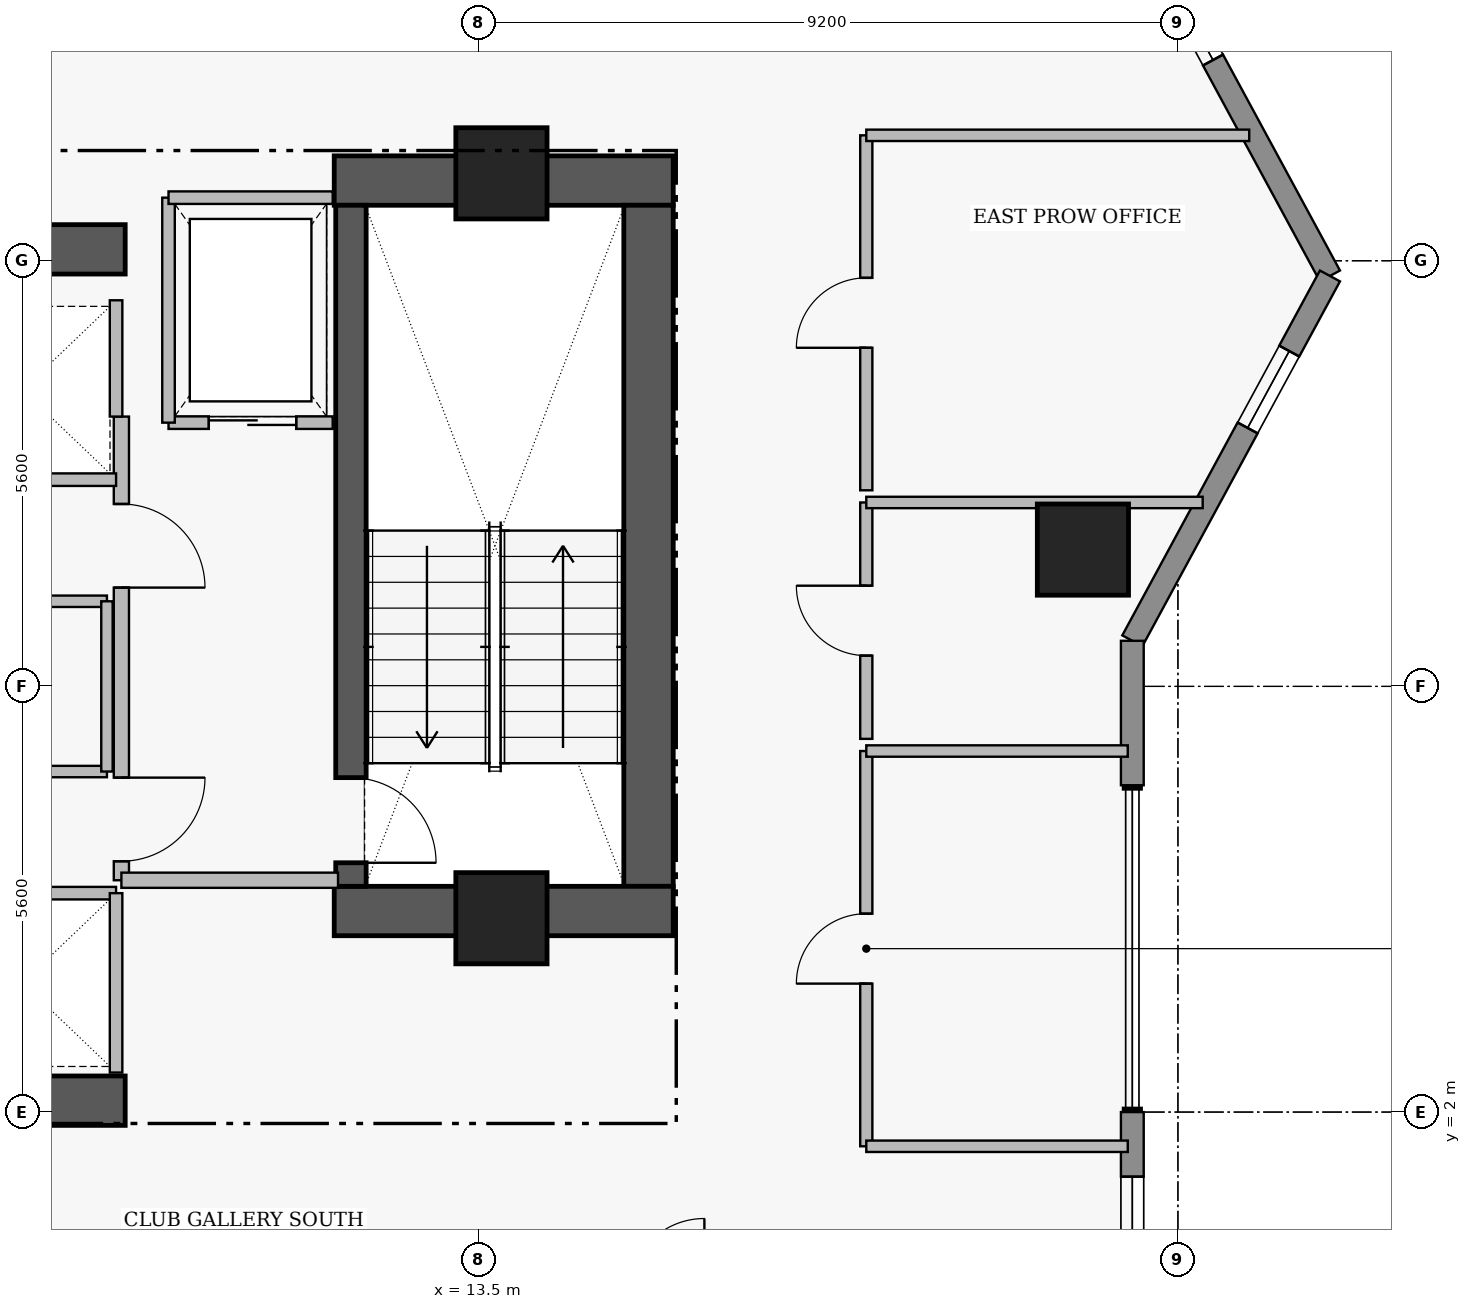
"""IFC4 building model, lengths in metres.
Left out: names, types, materials, properties, quantities, classifications, styles, units other than length and angle.
Written with IfcOpenShell. Run it as: python <this file> out.ifc"""

import sys

from ifc_helpers import new_model, si_unit, direction, frame, frame_2d, origin, origin_2d, place, context, subcontext, project, spatial, rectangle, extrude, element, fill, save


model = new_model("IFC4")
c1 = context("Model", 3, precision=1e-05, world=origin(), true_north=direction((0.0, 1.0)))
c2 = subcontext(c1, "Body", "Model", "MODEL_VIEW")
j1 = project(units=[si_unit("LENGTHUNIT", "METRE"), si_unit("PLANEANGLEUNIT", "RADIAN")], contexts=[c1])
p1 = place(None, origin())
s1 = spatial("IfcSite", under=j1, at=p1, CompositionType="ELEMENT")
p2 = place(p1, origin())
s2 = spatial("IfcBuilding", under=s1, at=p2, CompositionType="ELEMENT")
p3 = place(p2, frame((0.0, 0.0, 199.9)))
s3 = spatial("IfcBuildingStorey", under=s2, at=p3, CompositionType="ELEMENT", Elevation=199.9)
p4 = place(p3, frame((11.6, 14.255, 0.0), z_axis=(0.0, 0.0, 1.0), x_axis=(1.0, 0.0, 0.0)))
e1 = element("IfcWall", 1, at=p4, inside=s3, PredefinedType="SHEAR", context=c2, shape_type="SweptSolid", body=[
    extrude(rectangle(XDim=4.46, YDim=0.65, at=frame_2d((2.23, 0.0))), origin(), (0.0, 0.0, 1.0), 3.56),
])
p5 = place(p3, frame((15.735, 4.97, 0.0), z_axis=(0.0, 0.0, 1.0), x_axis=(0.0, 1.0, 0.0)))
e2 = element("IfcWall", 2, at=p5, inside=s3, PredefinedType="SHEAR", context=c2, shape_type="SweptSolid", body=[
    extrude(rectangle(XDim=8.96, YDim=0.65, at=frame_2d((4.48, 0.0))), origin(), (0.0, 0.0, 1.0), 3.56),
])
p6 = place(p3, frame((11.6, 4.645, 0.0), z_axis=(0.0, 0.0, 1.0), x_axis=(1.0, 0.0, 0.0)))
e3 = element("IfcWall", 3, at=p6, inside=s3, PredefinedType="SHEAR", context=c2, shape_type="SweptSolid", body=[
    extrude(rectangle(XDim=4.46, YDim=0.65, at=frame_2d((2.23, 0.0))), origin(), (0.0, 0.0, 1.0), 3.56),
])
for number, where, z_axis, x_axis in (
    (4, (1.25, 2.15, 0.0), (0.0, 0.0, 1.0), (1.0, 0.0, 0.0)),
    (5, (1.25, 13.35, 0.0), (0.0, 0.0, 1.0), (1.0, 0.0, 0.0)),
):
    element("IfcWall", number, at=place(p3, frame(where, z_axis=z_axis, x_axis=x_axis)), inside=s3, PredefinedType="SHEAR", context=c2, shape_type="SweptSolid", body=[
        extrude(rectangle(XDim=7.6, YDim=0.65, at=frame_2d((3.8, 0.0))), origin(), (0.0, 0.0, 1.0), 3.53),
    ])
p7 = place(p3, frame((11.82, 13.93, 0.0), z_axis=(0.0, 0.0, 1.0), x_axis=(0.0, -1.0, 0.0)))
e6 = element("IfcWall", 6, at=p7, inside=s3, PredefinedType="SHEAR", context=c2, shape_type="SweptSolid", body=[
    extrude(rectangle(XDim=8.96, YDim=0.4, at=frame_2d((4.48, 0.0))), origin(), (0.0, 0.0, 1.0), 3.56),
])
p8 = place(p7, frame((7.53, 0.0, 0.0)))
e7 = element("IfcOpeningElement", 7, at=p8, cuts=e6, PredefinedType="OPENING", context=c2, shape_type="SweptSolid", body=[
    extrude(rectangle(XDim=1.12, YDim=2.22, at=frame_2d((0.56, 1.11))), frame((0.0, 0.21, 0.0), z_axis=(0.0, -1.0, 0.0), x_axis=(1.0, 0.0, 0.0)), (0.0, 0.0, 1.0), 0.42),
])
for number, where, z_axis, x_axis in (
    (8, (13.8, 14.35, 0.0), (0.0, 0.0, 1.0), (1.0, 0.0, 0.0)),
    (9, (13.8, 4.55, 0.0), (0.0, 0.0, 1.0), (1.0, 0.0, 0.0)),
    (10, (21.45, 9.4, 0.0), (0.0, 0.0, 1.0), (1.0, 0.0, 0.0)),
):
    element("IfcColumn", number, at=place(p3, frame(where, z_axis=z_axis, x_axis=x_axis)), inside=s3, PredefinedType="COLUMN", context=c2, shape_type="SweptSolid", body=[
        extrude(rectangle(XDim=1.2, YDim=1.2, at=origin_2d()), origin(), (0.0, 0.0, 1.0), 3.75),
    ])
p9 = place(p3, frame((22.1, 17.8, 0.0), z_axis=(0.0, 0.0, 1.0), x_axis=(0.476258655584, -0.879305233114, 0.0)))
e11 = element("IfcWall", 11, at=p9, inside=s3, PredefinedType="STANDARD", context=c2, shape_type="SweptSolid", body=[
    extrude(rectangle(XDim=5.459, YDim=0.3, at=frame_2d((2.729, 0.0))), origin(), (0.0, 0.0, 1.0), 3.53),
])
p10 = place(p9, frame((1.078, 0.0, 1.25)))
e12 = element("IfcOpeningElement", 12, at=p10, cuts=e11, PredefinedType="OPENING", context=c2, shape_type="SweptSolid", body=[
    extrude(rectangle(XDim=1.15, YDim=1.55, at=frame_2d((0.575, 0.775))), frame((0.0, 0.16, 0.0), z_axis=(0.0, -1.0, 0.0), x_axis=(1.0, 0.0, 0.0)), (0.0, 0.0, 1.0), 0.32),
])
p11 = place(p3, frame((24.7, 13.0, 0.0), z_axis=(0.0, 0.0, 1.0), x_axis=(-0.476258655584, -0.879305233114, 0.0)))
e13 = element("IfcWall", 13, at=p11, inside=s3, PredefinedType="STANDARD", context=c2, shape_type="SweptSolid", body=[
    extrude(rectangle(XDim=5.459, YDim=0.3, at=frame_2d((2.729, 0.0))), origin(), (0.0, 0.0, 1.0), 3.53),
])
p12 = place(p11, frame((1.124, 0.0, 1.25)))
e14 = element("IfcOpeningElement", 14, at=p12, cuts=e13, PredefinedType="OPENING", context=c2, shape_type="SweptSolid", body=[
    extrude(rectangle(XDim=1.15, YDim=1.55, at=frame_2d((0.575, 0.775))), frame((0.0, 0.16, 0.0), z_axis=(0.0, -1.0, 0.0), x_axis=(1.0, 0.0, 0.0)), (0.0, 0.0, 1.0), 0.32),
])
p13 = place(p3, frame((22.1, 8.2, 0.0), z_axis=(0.0, 0.0, 1.0), x_axis=(0.0, -1.0, 0.0)))
e15 = element("IfcWall", 15, at=p13, inside=s3, PredefinedType="STANDARD", context=c2, shape_type="SweptSolid", body=[
    extrude(rectangle(XDim=1.9, YDim=0.3, at=frame_2d((0.95, 0.0))), origin(), (0.0, 0.0, 1.0), 3.53),
])
p14 = place(p3, frame((22.1, 2.0, 0.0), z_axis=(0.0, 0.0, 1.0), x_axis=(0.0, -1.0, 0.0)))
e16 = element("IfcWall", 16, at=p14, inside=s3, PredefinedType="STANDARD", context=c2, shape_type="SweptSolid", body=[
    extrude(rectangle(XDim=2.85, YDim=0.3, at=frame_2d((1.425, 0.0))), origin(), (0.0, 0.0, 1.0), 3.53),
])
p15 = place(p14, frame((0.85, 0.0, 0.95)))
e17 = element("IfcOpeningElement", 17, at=p15, cuts=e16, PredefinedType="OPENING", context=c2, shape_type="SweptSolid", body=[
    extrude(rectangle(XDim=1.15, YDim=1.55, at=frame_2d((0.575, 0.775))), frame((0.0, 0.16, 0.0), z_axis=(0.0, -1.0, 0.0), x_axis=(1.0, 0.0, 0.0)), (0.0, 0.0, 1.0), 0.32),
])
p16 = place(p3, frame((8.8, 11.15, 0.0), z_axis=(0.0, 0.0, 1.0), x_axis=(0.0, -1.0, 0.0)))
e18 = element("IfcWall", 18, at=p16, inside=s3, PredefinedType="PARTITIONING", context=c2, shape_type="SweptSolid", body=[
    extrude(rectangle(XDim=6.1, YDim=0.2, at=frame_2d((3.05, 0.0))), origin(), (0.0, 0.0, 1.0), 3.53),
])
p17 = place(p16, frame((1.15, 0.0, 0.0)))
e19 = element("IfcOpeningElement", 19, at=p17, cuts=e18, PredefinedType="OPENING", context=c2, shape_type="SweptSolid", body=[
    extrude(rectangle(XDim=1.1, YDim=2.2, at=frame_2d((0.55, 1.1))), frame((0.0, 0.11, 0.0), z_axis=(0.0, -1.0, 0.0), x_axis=(1.0, 0.0, 0.0)), (0.0, 0.0, 1.0), 0.22),
])
p18 = place(p16, frame((4.75, 0.0, 0.0)))
e20 = element("IfcOpeningElement", 20, at=p18, cuts=e18, PredefinedType="OPENING", context=c2, shape_type="SweptSolid", body=[
    extrude(rectangle(XDim=1.1, YDim=2.2, at=frame_2d((0.55, 1.1))), frame((0.0, 0.11, 0.0), z_axis=(0.0, -1.0, 0.0), x_axis=(1.0, 0.0, 0.0)), (0.0, 0.0, 1.0), 0.22),
])
p19 = place(p3, frame((9.42, 11.07, 0.0), z_axis=(0.0, 0.0, 1.0), x_axis=(1.0, 0.0, 0.0)))
e21 = element("IfcWall", 21, at=p19, inside=s3, PredefinedType="PARTITIONING", context=c2, shape_type="SweptSolid", body=[
    extrude(rectangle(XDim=2.16, YDim=0.165, at=frame_2d((1.08, 0.0))), origin(), (0.0, 0.0, 1.0), 3.53),
])
p20 = place(p19, frame((0.53, 0.0, 0.0)))
e22 = element("IfcOpeningElement", 22, at=p20, cuts=e21, PredefinedType="OPENING", context=c2, shape_type="SweptSolid", body=[
    extrude(rectangle(XDim=1.15, YDim=2.25, at=frame_2d((0.575, 1.125))), frame((0.0, 0.093, 0.0), z_axis=(0.0, -1.0, 0.0), x_axis=(1.0, 0.0, 0.0)), (0.0, 0.0, 1.0), 0.185),
])
p21 = place(p3, frame((4.37, 6.48, 0.0), z_axis=(0.0, 0.0, 1.0), x_axis=(1.0, 0.0, 0.0)))
e23 = element("IfcWall", 23, at=p21, inside=s3, PredefinedType="PARTITIONING", context=c2, shape_type="SweptSolid", body=[
    extrude(rectangle(XDim=4.24, YDim=0.15, at=frame_2d((2.12, 0.0))), origin(), (0.0, 0.0, 1.0), 3.53),
])
p22 = place(p21, frame((1.67, 0.0, 0.0)))
e24 = element("IfcOpeningElement", 24, at=p22, cuts=e23, PredefinedType="OPENING", context=c2, shape_type="SweptSolid", body=[
    extrude(rectangle(XDim=0.9, YDim=2.15, at=frame_2d((0.45, 1.075))), frame((0.0, 0.085, 0.0), z_axis=(0.0, -1.0, 0.0), x_axis=(1.0, 0.0, 0.0)), (0.0, 0.0, 1.0), 0.17),
])
p23 = place(p3, frame((18.6, 1.55, 0.0), z_axis=(0.0, 0.0, 1.0), x_axis=(0.0, 1.0, 0.0)))
e25 = element("IfcWall", 25, at=p23, inside=s3, PredefinedType="PARTITIONING", context=c2, shape_type="SweptSolid", body=[
    extrude(rectangle(XDim=5.2, YDim=0.16, at=frame_2d((2.6, 0.0))), origin(), (0.0, 0.0, 1.0), 3.53),
])
p24 = place(p23, frame((2.14, 0.0, 0.0)))
e26 = element("IfcOpeningElement", 26, at=p24, cuts=e25, PredefinedType="OPENING", context=c2, shape_type="SweptSolid", body=[
    extrude(rectangle(XDim=0.92, YDim=2.12, at=frame_2d((0.46, 1.06))), frame((0.0, 0.09, 0.0), z_axis=(0.0, -1.0, 0.0), x_axis=(1.0, 0.0, 0.0)), (0.0, 0.0, 1.0), 0.18),
])
p25 = place(p3, frame((18.6, 6.91, 0.0), z_axis=(0.0, 0.0, 1.0), x_axis=(0.0, 1.0, 0.0)))
e27 = element("IfcWall", 27, at=p25, inside=s3, PredefinedType="PARTITIONING", context=c2, shape_type="SweptSolid", body=[
    extrude(rectangle(XDim=3.11, YDim=0.16, at=frame_2d((1.555, 0.0))), origin(), (0.0, 0.0, 1.0), 3.53),
])
p26 = place(p25, frame((1.095, 0.0, 0.0)))
e28 = element("IfcOpeningElement", 28, at=p26, cuts=e27, PredefinedType="OPENING", context=c2, shape_type="SweptSolid", body=[
    extrude(rectangle(XDim=0.92, YDim=2.12, at=frame_2d((0.46, 1.06))), frame((0.0, 0.09, 0.0), z_axis=(0.0, -1.0, 0.0), x_axis=(1.0, 0.0, 0.0)), (0.0, 0.0, 1.0), 0.18),
])
p27 = place(p3, frame((18.6, 10.18, 0.0), z_axis=(0.0, 0.0, 1.0), x_axis=(0.0, 1.0, 0.0)))
e29 = element("IfcWall", 29, at=p27, inside=s3, PredefinedType="PARTITIONING", context=c2, shape_type="SweptSolid", body=[
    extrude(rectangle(XDim=4.67, YDim=0.16, at=frame_2d((2.335, 0.0))), origin(), (0.0, 0.0, 1.0), 3.53),
])
p28 = place(p27, frame((1.875, 0.0, 0.0)))
e30 = element("IfcOpeningElement", 30, at=p28, cuts=e29, PredefinedType="OPENING", context=c2, shape_type="SweptSolid", body=[
    extrude(rectangle(XDim=0.92, YDim=2.12, at=frame_2d((0.46, 1.06))), frame((0.0, 0.09, 0.0), z_axis=(0.0, -1.0, 0.0), x_axis=(1.0, 0.0, 0.0)), (0.0, 0.0, 1.0), 0.18),
])
p29 = place(p3, frame((8.8, 5.05, 0.0), z_axis=(0.0, 0.0, 1.0), x_axis=(1.0, 0.0, 0.0)))
e31 = element("IfcWall", 31, at=p29, inside=s3, PredefinedType="PARTITIONING", context=c2, shape_type="SweptSolid", body=[
    extrude(rectangle(XDim=2.85, YDim=0.2, at=frame_2d((1.425, 0.0))), origin(), (0.0, 0.0, 1.0), 3.53),
])
p30 = place(p3, frame((9.42, 11.07, 0.0), z_axis=(0.0, 0.0, 1.0), x_axis=(0.0, 1.0, 0.0)))
e32 = element("IfcWall", 32, at=p30, inside=s3, PredefinedType="PARTITIONING", context=c2, shape_type="SweptSolid", body=[
    extrude(rectangle(XDim=2.96, YDim=0.165, at=frame_2d((1.48, 0.0))), origin(), (0.0, 0.0, 1.0), 3.53),
])
p31 = place(p3, frame((9.42, 14.03, 0.0), z_axis=(0.0, 0.0, 1.0), x_axis=(1.0, 0.0, 0.0)))
e33 = element("IfcWall", 33, at=p31, inside=s3, PredefinedType="PARTITIONING", context=c2, shape_type="SweptSolid", body=[
    extrude(rectangle(XDim=2.16, YDim=0.165, at=frame_2d((1.08, 0.0))), origin(), (0.0, 0.0, 1.0), 3.53),
])
p32 = place(p3, frame((6.25, 4.88, 0.0), z_axis=(0.0, 0.0, 1.0), x_axis=(1.0, 0.0, 0.0)))
e34 = element("IfcWall", 34, at=p32, inside=s3, PredefinedType="PARTITIONING", context=c2, shape_type="SweptSolid", body=[
    extrude(rectangle(XDim=2.48, YDim=0.165, at=frame_2d((1.24, 0.0))), origin(), (0.0, 0.0, 1.0), 3.53),
])
p33 = place(p3, frame((8.73, 2.52, 0.0), z_axis=(0.0, 0.0, 1.0), x_axis=(0.0, 1.0, 0.0)))
e35 = element("IfcWall", 35, at=p33, inside=s3, PredefinedType="PARTITIONING", context=c2, shape_type="SweptSolid", body=[
    extrude(rectangle(XDim=2.36, YDim=0.165, at=frame_2d((1.18, 0.0))), origin(), (0.0, 0.0, 1.0), 3.53),
])
p34 = place(p3, frame((6.25, 10.32, 0.0), z_axis=(0.0, 0.0, 1.0), x_axis=(1.0, 0.0, 0.0)))
e36 = element("IfcWall", 36, at=p34, inside=s3, PredefinedType="PARTITIONING", context=c2, shape_type="SweptSolid", body=[
    extrude(rectangle(XDim=2.48, YDim=0.165, at=frame_2d((1.24, 0.0))), origin(), (0.0, 0.0, 1.0), 3.53),
])
p35 = place(p3, frame((8.73, 11.15, 0.0), z_axis=(0.0, 0.0, 1.0), x_axis=(0.0, 1.0, 0.0)))
e37 = element("IfcWall", 37, at=p35, inside=s3, PredefinedType="PARTITIONING", context=c2, shape_type="SweptSolid", body=[
    extrude(rectangle(XDim=1.53, YDim=0.165, at=frame_2d((0.765, 0.0))), origin(), (0.0, 0.0, 1.0), 3.53),
])
p36 = place(p3, frame((4.37, 8.72, 0.0), z_axis=(0.0, 0.0, 1.0), x_axis=(1.0, 0.0, 0.0)))
e38 = element("IfcWall", 38, at=p36, inside=s3, PredefinedType="PARTITIONING", context=c2, shape_type="SweptSolid", body=[
    extrude(rectangle(XDim=4.24, YDim=0.15, at=frame_2d((2.12, 0.0))), origin(), (0.0, 0.0, 1.0), 3.53),
])
p37 = place(p3, frame((8.61, 6.48, 0.0), z_axis=(0.0, 0.0, 1.0), x_axis=(0.0, 1.0, 0.0)))
e39 = element("IfcWall", 39, at=p37, inside=s3, PredefinedType="PARTITIONING", context=c2, shape_type="SweptSolid", body=[
    extrude(rectangle(XDim=2.24, YDim=0.15, at=frame_2d((1.12, 0.0))), origin(), (0.0, 0.0, 1.0), 3.53),
])
for number, where, z_axis, x_axis in (
    (40, (18.6, 1.55, 0.0), (0.0, 0.0, 1.0), (1.0, 0.0, 0.0)),
    (41, (18.6, 6.75, 0.0), (0.0, 0.0, 1.0), (1.0, 0.0, 0.0)),
):
    element("IfcWall", number, at=place(p3, frame(where, z_axis=z_axis, x_axis=x_axis)), inside=s3, PredefinedType="PARTITIONING", context=c2, shape_type="SweptSolid", body=[
        extrude(rectangle(XDim=3.44, YDim=0.15, at=frame_2d((1.72, 0.0))), origin(), (0.0, 0.0, 1.0), 3.53),
    ])
p38 = place(p3, frame((18.6, 10.02, 0.0), z_axis=(0.0, 0.0, 1.0), x_axis=(1.0, 0.0, 0.0)))
e42 = element("IfcWall", 42, at=p38, inside=s3, PredefinedType="PARTITIONING", context=c2, shape_type="SweptSolid", body=[
    extrude(rectangle(XDim=4.426, YDim=0.15, at=frame_2d((2.213, 0.0))), origin(), (0.0, 0.0, 1.0), 3.53),
])
p39 = place(p3, frame((18.6, 14.85, 0.0), z_axis=(0.0, 0.0, 1.0), x_axis=(1.0, 0.0, 0.0)))
e43 = element("IfcWall", 43, at=p39, inside=s3, PredefinedType="PARTITIONING", context=c2, shape_type="SweptSolid", body=[
    extrude(rectangle(XDim=5.038, YDim=0.15, at=frame_2d((2.519, 0.0))), origin(), (0.0, 0.0, 1.0), 3.53),
])
p40 = place(p10, origin())
e44 = element("IfcWindow", 44, at=p40, inside=s3, PartitioningType="SINGLE_PANEL", PredefinedType="WINDOW", context=c2, shape_type="SweptSolid", body=[
    extrude(rectangle(XDim=1.15, YDim=1.55, at=frame_2d((0.575, 0.775))), frame((0.0, 0.03, 0.0), z_axis=(0.0, -1.0, 0.0), x_axis=(1.0, 0.0, 0.0)), (0.0, 0.0, 1.0), 0.06),
])
fill(e12, e44)
p41 = place(p12, origin())
e45 = element("IfcWindow", 45, at=p41, inside=s3, PartitioningType="SINGLE_PANEL", PredefinedType="WINDOW", context=c2, shape_type="SweptSolid", body=[
    extrude(rectangle(XDim=1.15, YDim=1.55, at=frame_2d((0.575, 0.775))), frame((0.0, 0.03, 0.0), z_axis=(0.0, -1.0, 0.0), x_axis=(1.0, 0.0, 0.0)), (0.0, 0.0, 1.0), 0.06),
])
fill(e14, e45)
p42 = place(p15, origin())
e46 = element("IfcWindow", 46, at=p42, inside=s3, PartitioningType="SINGLE_PANEL", PredefinedType="WINDOW", context=c2, shape_type="SweptSolid", body=[
    extrude(rectangle(XDim=1.15, YDim=1.55, at=frame_2d((0.575, 0.775))), frame((0.0, 0.03, 0.0), z_axis=(0.0, -1.0, 0.0), x_axis=(1.0, 0.0, 0.0)), (0.0, 0.0, 1.0), 0.06),
])
fill(e17, e46)
p43 = place(p8, origin())
e47 = element("IfcDoor", 47, at=p43, inside=s3, OperationType="SINGLE_SWING_RIGHT", PredefinedType="DOOR", context=c2, shape_type="SweptSolid", body=[
    extrude(rectangle(XDim=1.12, YDim=2.22, at=frame_2d((0.56, 1.11))), frame((0.0, 0.025, 0.0), z_axis=(0.0, -1.0, 0.0), x_axis=(1.0, 0.0, 0.0)), (0.0, 0.0, 1.0), 0.05),
])
fill(e7, e47)
p44 = place(p17, origin())
e48 = element("IfcDoor", 48, at=p44, inside=s3, OperationType="SINGLE_SWING_RIGHT", PredefinedType="DOOR", context=c2, shape_type="SweptSolid", body=[
    extrude(rectangle(XDim=1.1, YDim=2.2, at=frame_2d((0.55, 1.1))), frame((0.0, 0.025, 0.0), z_axis=(0.0, -1.0, 0.0), x_axis=(1.0, 0.0, 0.0)), (0.0, 0.0, 1.0), 0.05),
])
fill(e19, e48)
p45 = place(p18, origin())
e49 = element("IfcDoor", 49, at=p45, inside=s3, OperationType="SINGLE_SWING_LEFT", PredefinedType="DOOR", context=c2, shape_type="SweptSolid", body=[
    extrude(rectangle(XDim=1.1, YDim=2.2, at=frame_2d((0.55, 1.1))), frame((0.0, 0.025, 0.0), z_axis=(0.0, -1.0, 0.0), x_axis=(1.0, 0.0, 0.0)), (0.0, 0.0, 1.0), 0.05),
])
fill(e20, e49)
p46 = place(p20, origin())
e50 = element("IfcDoor", 50, at=p46, inside=s3, OperationType="SLIDING_TO_LEFT", PredefinedType="DOOR", context=c2, shape_type="SweptSolid", body=[
    extrude(rectangle(XDim=1.15, YDim=2.25, at=frame_2d((0.575, 1.125))), frame((0.0, 0.025, 0.0), z_axis=(0.0, -1.0, 0.0), x_axis=(1.0, 0.0, 0.0)), (0.0, 0.0, 1.0), 0.05),
])
fill(e22, e50)
p47 = place(p24, origin())
e51 = element("IfcDoor", 51, at=p47, inside=s3, OperationType="SINGLE_SWING_LEFT", PredefinedType="DOOR", context=c2, shape_type="SweptSolid", body=[
    extrude(rectangle(XDim=0.92, YDim=2.12, at=frame_2d((0.46, 1.06))), frame((0.0, 0.025, 0.0), z_axis=(0.0, -1.0, 0.0), x_axis=(1.0, 0.0, 0.0)), (0.0, 0.0, 1.0), 0.05),
])
fill(e26, e51)
p48 = place(p26, origin())
e52 = element("IfcDoor", 52, at=p48, inside=s3, OperationType="SINGLE_SWING_RIGHT", PredefinedType="DOOR", context=c2, shape_type="SweptSolid", body=[
    extrude(rectangle(XDim=0.92, YDim=2.12, at=frame_2d((0.46, 1.06))), frame((0.0, 0.025, 0.0), z_axis=(0.0, -1.0, 0.0), x_axis=(1.0, 0.0, 0.0)), (0.0, 0.0, 1.0), 0.05),
])
fill(e28, e52)
p49 = place(p28, origin())
e53 = element("IfcDoor", 53, at=p49, inside=s3, OperationType="SINGLE_SWING_LEFT", PredefinedType="DOOR", context=c2, shape_type="SweptSolid", body=[
    extrude(rectangle(XDim=0.92, YDim=2.12, at=frame_2d((0.46, 1.06))), frame((0.0, 0.025, 0.0), z_axis=(0.0, -1.0, 0.0), x_axis=(1.0, 0.0, 0.0)), (0.0, 0.0, 1.0), 0.05),
])
fill(e30, e53)
save(model, sys.argv[1])
